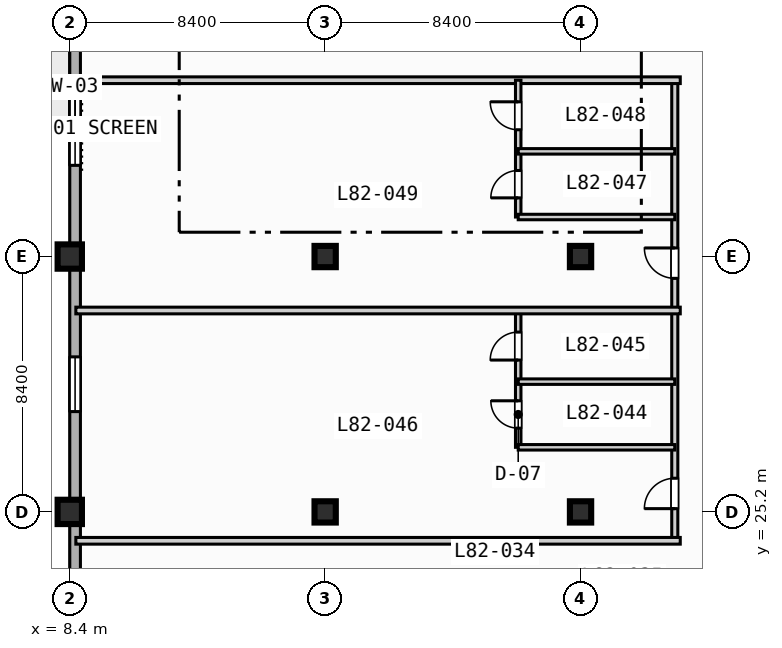
"""IFC4 building model, lengths in metres.
Left out: names, types, materials, properties, quantities, classifications, styles, units other than length and angle.
Written with IfcOpenShell. Run it as: python <this file> out.ifc"""

import sys

from ifc_helpers import new_model, si_unit, direction, frame, frame_2d, origin, origin_2d, place, context, subcontext, project, spatial, rectangle, extrude, element, fill, save


model = new_model("IFC4")
c1 = context("Model", 3, precision=1e-05, world=origin(), true_north=direction((0.0, 1.0)))
c2 = subcontext(c1, "Body", "Model", "MODEL_VIEW")
j1 = project(units=[si_unit("LENGTHUNIT", "METRE"), si_unit("PLANEANGLEUNIT", "RADIAN")], contexts=[c1])
p1 = place(None, origin())
s1 = spatial("IfcSite", under=j1, at=p1, CompositionType="ELEMENT")
p2 = place(p1, origin())
s2 = spatial("IfcBuilding", under=s1, at=p2, CompositionType="ELEMENT")
p3 = place(p2, frame((0.0, 0.0, 332.0)))
s3 = spatial("IfcBuildingStorey", under=s2, at=p3, CompositionType="ELEMENT", Elevation=332.0)
for number, where, z_axis, x_axis in (
    (1, (8.4, 25.2, 0.0), (0.0, 0.0, 1.0), (1.0, 0.0, 0.0)),
    (2, (8.4, 33.6, 0.0), (0.0, 0.0, 1.0), (1.0, 0.0, 0.0)),
):
    element("IfcColumn", number, at=place(p3, frame(where, z_axis=z_axis, x_axis=x_axis)), inside=s3, PredefinedType="COLUMN", context=c2, shape_type="SweptSolid", body=[
        extrude(rectangle(XDim=0.8, YDim=0.8, at=origin_2d()), origin(), (0.0, 0.0, 1.0), 3.9),
    ])
for number, where, z_axis, x_axis in (
    (3, (16.8, 25.2, 0.0), (0.0, 0.0, 1.0), (1.0, 0.0, 0.0)),
    (4, (16.8, 33.6, 0.0), (0.0, 0.0, 1.0), (1.0, 0.0, 0.0)),
    (5, (25.2, 25.2, 0.0), (0.0, 0.0, 1.0), (1.0, 0.0, 0.0)),
    (6, (25.2, 33.6, 0.0), (0.0, 0.0, 1.0), (1.0, 0.0, 0.0)),
):
    element("IfcColumn", number, at=place(p3, frame(where, z_axis=z_axis, x_axis=x_axis)), inside=s3, PredefinedType="COLUMN", context=c2, shape_type="SweptSolid", body=[
        extrude(rectangle(XDim=0.7, YDim=0.7, at=origin_2d()), origin(), (0.0, 0.0, 1.0), 3.9),
    ])
p4 = place(p3, frame((8.575, 11.575, 0.0), z_axis=(0.0, 0.0, 1.0), x_axis=(0.0, 1.0, 0.0)))
e7 = element("IfcWall", 7, at=p4, inside=s3, PredefinedType="STANDARD", context=c2, shape_type="SweptSolid", body=[
    extrude(rectangle(XDim=60.85, YDim=0.35, at=frame_2d((30.425, 0.0))), origin(), (0.0, 0.0, 1.0), 3.67),
])
p5 = place(p4, frame((33.925, 0.0, 0.0)))
e8 = element("IfcOpeningElement", 8, at=p5, cuts=e7, PredefinedType="OPENING", context=c2, shape_type="SweptSolid", body=[
    extrude(rectangle(XDim=1.4, YDim=2.2, at=frame_2d((0.7, 1.1))), frame((0.0, 0.185, 0.0), z_axis=(0.0, -1.0, 0.0), x_axis=(1.0, 0.0, 0.0)), (0.0, 0.0, 1.0), 0.37),
])
p6 = place(p4, frame((16.925, 0.0, 0.85)))
e9 = element("IfcOpeningElement", 9, at=p6, cuts=e7, PredefinedType="OPENING", context=c2, shape_type="SweptSolid", body=[
    extrude(rectangle(XDim=1.8, YDim=1.8, at=frame_2d((0.9, 0.9))), frame((0.0, 0.185, 0.0), z_axis=(0.0, -1.0, 0.0), x_axis=(1.0, 0.0, 0.0)), (0.0, 0.0, 1.0), 0.37),
])
p7 = place(p4, frame((25.025, 0.0, 0.85)))
e10 = element("IfcOpeningElement", 10, at=p7, cuts=e7, PredefinedType="OPENING", context=c2, shape_type="SweptSolid", body=[
    extrude(rectangle(XDim=2.4, YDim=1.95, at=frame_2d((1.2, 0.975))), frame((0.0, 0.185, 0.0), z_axis=(0.0, -1.0, 0.0), x_axis=(1.0, 0.0, 0.0)), (0.0, 0.0, 1.0), 0.37),
])
p8 = place(p4, frame((41.825, 0.0, 0.85)))
e11 = element("IfcOpeningElement", 11, at=p8, cuts=e7, PredefinedType="OPENING", context=c2, shape_type="SweptSolid", body=[
    extrude(rectangle(XDim=2.4, YDim=1.95, at=frame_2d((1.2, 0.975))), frame((0.0, 0.185, 0.0), z_axis=(0.0, -1.0, 0.0), x_axis=(1.0, 0.0, 0.0)), (0.0, 0.0, 1.0), 0.37),
])
p9 = place(p3, frame((28.3, 24.25, 0.0), z_axis=(0.0, 0.0, 1.0), x_axis=(0.0, 1.0, 0.0)))
e12 = element("IfcWall", 12, at=p9, inside=s3, PredefinedType="PARTITIONING", context=c2, shape_type="SweptSolid", body=[
    extrude(rectangle(XDim=15.15, YDim=0.2, at=frame_2d((7.575, 0.0))), origin(), (0.0, 0.0, 1.0), 3.67),
])
p10 = place(p9, frame((1.058, 0.0, 0.0)))
e13 = element("IfcOpeningElement", 13, at=p10, cuts=e12, PredefinedType="OPENING", context=c2, shape_type="SweptSolid", body=[
    extrude(rectangle(XDim=1.0, YDim=2.15, at=frame_2d((0.5, 1.075))), frame((0.0, 0.11, 0.0), z_axis=(0.0, -1.0, 0.0), x_axis=(1.0, 0.0, 0.0)), (0.0, 0.0, 1.0), 0.22),
])
p11 = place(p9, frame((8.633, 0.0, 0.0)))
e14 = element("IfcOpeningElement", 14, at=p11, cuts=e12, PredefinedType="OPENING", context=c2, shape_type="SweptSolid", body=[
    extrude(rectangle(XDim=1.0, YDim=2.15, at=frame_2d((0.5, 1.075))), frame((0.0, 0.11, 0.0), z_axis=(0.0, -1.0, 0.0), x_axis=(1.0, 0.0, 0.0)), (0.0, 0.0, 1.0), 0.22),
])
p12 = place(p3, frame((8.6, 24.25, 0.0), z_axis=(0.0, 0.0, 1.0), x_axis=(1.0, 0.0, 0.0)))
e15 = element("IfcWall", 15, at=p12, inside=s3, PredefinedType="PARTITIONING", context=c2, shape_type="SweptSolid", body=[
    extrude(rectangle(XDim=19.88, YDim=0.22, at=frame_2d((9.94, 0.0))), origin(), (0.0, 0.0, 1.0), 3.67),
])
p13 = place(p3, frame((23.15, 27.325, 0.0), z_axis=(0.0, 0.0, 1.0), x_axis=(0.0, 1.0, 0.0)))
e16 = element("IfcWall", 16, at=p13, inside=s3, PredefinedType="PLUMBINGWALL", context=c2, shape_type="SweptSolid", body=[
    extrude(rectangle(XDim=4.5, YDim=0.18, at=frame_2d((2.25, 0.0))), origin(), (0.0, 0.0, 1.0), 3.67),
])
p14 = place(p13, frame((0.63, 0.0, 0.0)))
e17 = element("IfcOpeningElement", 17, at=p14, cuts=e16, PredefinedType="OPENING", context=c2, shape_type="SweptSolid", body=[
    extrude(rectangle(XDim=0.9, YDim=2.1, at=frame_2d((0.45, 1.05))), frame((0.0, 0.1, 0.0), z_axis=(0.0, -1.0, 0.0), x_axis=(1.0, 0.0, 0.0)), (0.0, 0.0, 1.0), 0.2),
])
p15 = place(p13, frame((2.87, 0.0, 0.0)))
e18 = element("IfcOpeningElement", 18, at=p15, cuts=e16, PredefinedType="OPENING", context=c2, shape_type="SweptSolid", body=[
    extrude(rectangle(XDim=0.92, YDim=2.1, at=frame_2d((0.46, 1.05))), frame((0.0, 0.1, 0.0), z_axis=(0.0, -1.0, 0.0), x_axis=(1.0, 0.0, 0.0)), (0.0, 0.0, 1.0), 0.2),
])
for number, where, z_axis, x_axis in (
    (19, (23.15, 27.325, 0.0), (0.0, 0.0, 1.0), (1.0, 0.0, 0.0)),
    (20, (23.15, 29.485, 0.0), (0.0, 0.0, 1.0), (1.0, 0.0, 0.0)),
):
    element("IfcWall", number, at=place(p3, frame(where, z_axis=z_axis, x_axis=x_axis)), inside=s3, PredefinedType="PLUMBINGWALL", context=c2, shape_type="SweptSolid", body=[
        extrude(rectangle(XDim=5.15, YDim=0.18, at=frame_2d((2.575, 0.0))), origin(), (0.0, 0.0, 1.0), 3.67),
    ])
for number, where, z_axis, x_axis in (
    (21, (8.6, 31.825, 0.0), (0.0, 0.0, 1.0), (1.0, 0.0, 0.0)),
    (22, (8.6, 39.4, 0.0), (0.0, 0.0, 1.0), (1.0, 0.0, 0.0)),
):
    element("IfcWall", number, at=place(p3, frame(where, z_axis=z_axis, x_axis=x_axis)), inside=s3, PredefinedType="PARTITIONING", context=c2, shape_type="SweptSolid", body=[
        extrude(rectangle(XDim=19.88, YDim=0.22, at=frame_2d((9.94, 0.0))), origin(), (0.0, 0.0, 1.0), 3.67),
    ])
p16 = place(p3, frame((23.15, 34.9, 0.0), z_axis=(0.0, 0.0, 1.0), x_axis=(0.0, 1.0, 0.0)))
e23 = element("IfcWall", 23, at=p16, inside=s3, PredefinedType="PLUMBINGWALL", context=c2, shape_type="SweptSolid", body=[
    extrude(rectangle(XDim=4.5, YDim=0.18, at=frame_2d((2.25, 0.0))), origin(), (0.0, 0.0, 1.0), 3.67),
])
p17 = place(p16, frame((0.63, 0.0, 0.0)))
e24 = element("IfcOpeningElement", 24, at=p17, cuts=e23, PredefinedType="OPENING", context=c2, shape_type="SweptSolid", body=[
    extrude(rectangle(XDim=0.9, YDim=2.1, at=frame_2d((0.45, 1.05))), frame((0.0, 0.1, 0.0), z_axis=(0.0, -1.0, 0.0), x_axis=(1.0, 0.0, 0.0)), (0.0, 0.0, 1.0), 0.2),
])
p18 = place(p16, frame((2.87, 0.0, 0.0)))
e25 = element("IfcOpeningElement", 25, at=p18, cuts=e23, PredefinedType="OPENING", context=c2, shape_type="SweptSolid", body=[
    extrude(rectangle(XDim=0.92, YDim=2.1, at=frame_2d((0.46, 1.05))), frame((0.0, 0.1, 0.0), z_axis=(0.0, -1.0, 0.0), x_axis=(1.0, 0.0, 0.0)), (0.0, 0.0, 1.0), 0.2),
])
for number, where, z_axis, x_axis in (
    (26, (23.15, 34.9, 0.0), (0.0, 0.0, 1.0), (1.0, 0.0, 0.0)),
    (27, (23.15, 37.06, 0.0), (0.0, 0.0, 1.0), (1.0, 0.0, 0.0)),
):
    element("IfcWall", number, at=place(p3, frame(where, z_axis=z_axis, x_axis=x_axis)), inside=s3, PredefinedType="PLUMBINGWALL", context=c2, shape_type="SweptSolid", body=[
        extrude(rectangle(XDim=5.15, YDim=0.18, at=frame_2d((2.575, 0.0))), origin(), (0.0, 0.0, 1.0), 3.67),
    ])
p19 = place(p6, origin())
e28 = element("IfcWindow", 28, at=p19, inside=s3, PartitioningType="SINGLE_PANEL", PredefinedType="WINDOW", context=c2, shape_type="SweptSolid", body=[
    extrude(rectangle(XDim=1.8, YDim=1.8, at=frame_2d((0.9, 0.9))), frame((0.0, 0.03, 0.0), z_axis=(0.0, -1.0, 0.0), x_axis=(1.0, 0.0, 0.0)), (0.0, 0.0, 1.0), 0.06),
])
fill(e9, e28)
p20 = place(p7, origin())
e29 = element("IfcWindow", 29, at=p20, inside=s3, PartitioningType="SINGLE_PANEL", PredefinedType="WINDOW", context=c2, shape_type="SweptSolid", body=[
    extrude(rectangle(XDim=2.4, YDim=1.95, at=frame_2d((1.2, 0.975))), frame((0.0, 0.03, 0.0), z_axis=(0.0, -1.0, 0.0), x_axis=(1.0, 0.0, 0.0)), (0.0, 0.0, 1.0), 0.06),
])
fill(e10, e29)
p21 = place(p10, origin())
e30 = element("IfcDoor", 30, at=p21, inside=s3, OperationType="SINGLE_SWING_LEFT", PredefinedType="DOOR", context=c2, shape_type="SweptSolid", body=[
    extrude(rectangle(XDim=1.0, YDim=2.15, at=frame_2d((0.5, 1.075))), frame((0.0, 0.025, 0.0), z_axis=(0.0, -1.0, 0.0), x_axis=(1.0, 0.0, 0.0)), (0.0, 0.0, 1.0), 0.05),
])
fill(e13, e30)
p22 = place(p11, origin())
e31 = element("IfcDoor", 31, at=p22, inside=s3, OperationType="SINGLE_SWING_RIGHT", PredefinedType="DOOR", context=c2, shape_type="SweptSolid", body=[
    extrude(rectangle(XDim=1.0, YDim=2.15, at=frame_2d((0.5, 1.075))), frame((0.0, 0.025, 0.0), z_axis=(0.0, -1.0, 0.0), x_axis=(1.0, 0.0, 0.0)), (0.0, 0.0, 1.0), 0.05),
])
fill(e14, e31)
p23 = place(p14, origin())
e32 = element("IfcDoor", 32, at=p23, inside=s3, OperationType="SINGLE_SWING_RIGHT", PredefinedType="DOOR", context=c2, shape_type="SweptSolid", body=[
    extrude(rectangle(XDim=0.9, YDim=2.1, at=frame_2d((0.45, 1.05))), frame((0.0, 0.025, 0.0), z_axis=(0.0, -1.0, 0.0), x_axis=(1.0, 0.0, 0.0)), (0.0, 0.0, 1.0), 0.05),
])
fill(e17, e32)
p24 = place(p15, origin())
e33 = element("IfcDoor", 33, at=p24, inside=s3, OperationType="SINGLE_SWING_LEFT", PredefinedType="DOOR", context=c2, shape_type="SweptSolid", body=[
    extrude(rectangle(XDim=0.92, YDim=2.1, at=frame_2d((0.46, 1.05))), frame((0.0, 0.025, 0.0), z_axis=(0.0, -1.0, 0.0), x_axis=(1.0, 0.0, 0.0)), (0.0, 0.0, 1.0), 0.05),
])
fill(e18, e33)
p25 = place(p17, origin())
e34 = element("IfcDoor", 34, at=p25, inside=s3, OperationType="SINGLE_SWING_LEFT", PredefinedType="DOOR", context=c2, shape_type="SweptSolid", body=[
    extrude(rectangle(XDim=0.9, YDim=2.1, at=frame_2d((0.45, 1.05))), frame((0.0, 0.025, 0.0), z_axis=(0.0, -1.0, 0.0), x_axis=(1.0, 0.0, 0.0)), (0.0, 0.0, 1.0), 0.05),
])
fill(e24, e34)
p26 = place(p18, origin())
e35 = element("IfcDoor", 35, at=p26, inside=s3, OperationType="SINGLE_SWING_RIGHT", PredefinedType="DOOR", context=c2, shape_type="SweptSolid", body=[
    extrude(rectangle(XDim=0.92, YDim=2.1, at=frame_2d((0.46, 1.05))), frame((0.0, 0.025, 0.0), z_axis=(0.0, -1.0, 0.0), x_axis=(1.0, 0.0, 0.0)), (0.0, 0.0, 1.0), 0.05),
])
fill(e25, e35)
save(model, sys.argv[1])
